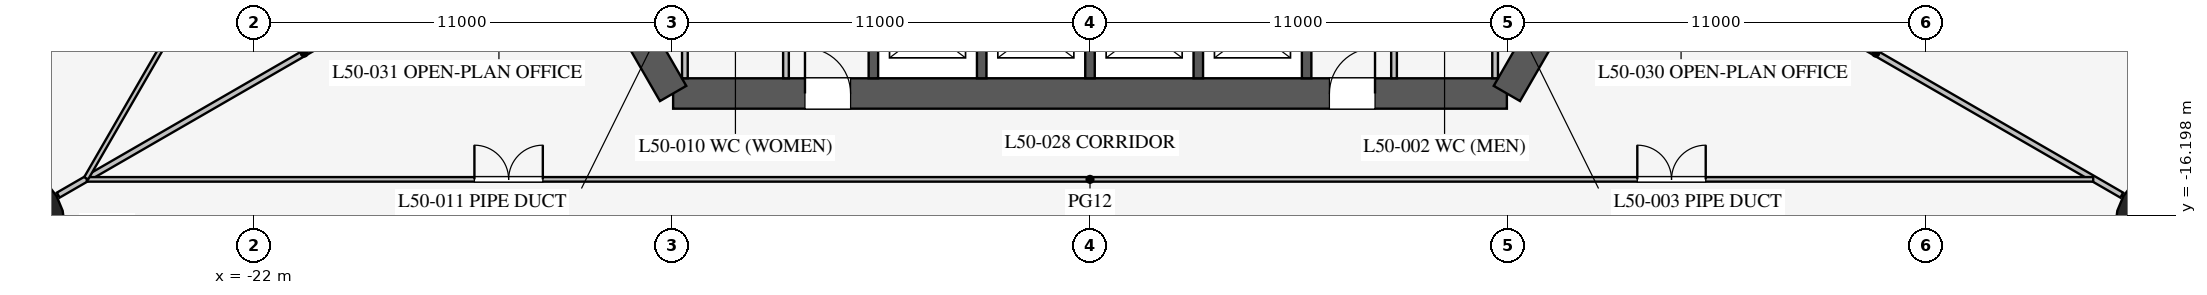
"""IFC4 building model, lengths in metres.
Left out: names, types, materials, properties, quantities, classifications, styles, units other than length and angle.
Written with IfcOpenShell. Run it as: python <this file> out.ifc"""

import sys

from ifc_helpers import new_model, si_unit, direction, frame, frame_2d, origin, origin_2d, place, context, subcontext, project, spatial, rectangle, circle, extrude, element, fill, save


model = new_model("IFC4")
c1 = context("Model", 3, precision=1e-05, world=origin(), true_north=direction((0.0, 1.0)))
c2 = subcontext(c1, "Body", "Model", "MODEL_VIEW")
j1 = project(units=[si_unit("LENGTHUNIT", "METRE"), si_unit("PLANEANGLEUNIT", "RADIAN")], contexts=[c1])
p1 = place(None, origin())
s1 = spatial("IfcSite", under=j1, at=p1, CompositionType="ELEMENT")
p2 = place(p1, origin())
s2 = spatial("IfcBuilding", under=s1, at=p2, CompositionType="ELEMENT")
p3 = place(p2, frame((0.0, 0.0, 219.1)))
s3 = spatial("IfcBuildingStorey", under=s2, at=p3, CompositionType="ELEMENT", Elevation=219.1)
for number, where, z_axis, x_axis in (
    (1, (28.579, -16.5, 0.0), (0.0, 0.0, 1.0), (1.0, 0.0, 0.0)),
    (2, (-28.579, -16.5, 0.0), (0.0, 0.0, 1.0), (1.0, 0.0, 0.0)),
):
    element("IfcColumn", number, at=place(p3, frame(where, z_axis=z_axis, x_axis=x_axis)), inside=s3, PredefinedType="COLUMN", context=c2, shape_type="SweptSolid", body=[
        extrude(circle(Radius=1.6, at=origin_2d()), origin(), (0.0, 0.0, 1.0), 4.2),
    ])
p4 = place(p3, frame((-10.97, -13.0, 0.0), z_axis=(0.0, 0.0, 1.0), x_axis=(1.0, 0.0, 0.0)))
e3 = element("IfcWall", 3, at=p4, inside=s3, PredefinedType="SHEAR", context=c2, shape_type="SweptSolid", body=[
    extrude(rectangle(XDim=21.939, YDim=0.8, at=frame_2d((10.97, 0.0))), origin(), (0.0, 0.0, 1.0), 4.2),
])
p5 = place(p4, frame((17.27, 0.0, 0.0)))
e4 = element("IfcOpeningElement", 4, at=p5, cuts=e3, PredefinedType="OPENING", context=c2, shape_type="SweptSolid", body=[
    extrude(rectangle(XDim=1.2, YDim=2.1, at=frame_2d((0.6, 1.05))), frame((0.0, 0.41, 0.0), z_axis=(0.0, -1.0, 0.0), x_axis=(1.0, 0.0, 0.0)), (0.0, 0.0, 1.0), 0.82),
])
p6 = place(p4, frame((3.47, 0.0, 0.0)))
e5 = element("IfcOpeningElement", 5, at=p6, cuts=e3, PredefinedType="OPENING", context=c2, shape_type="SweptSolid", body=[
    extrude(rectangle(XDim=1.2, YDim=2.1, at=frame_2d((0.6, 1.05))), frame((0.0, 0.41, 0.0), z_axis=(0.0, -1.0, 0.0), x_axis=(1.0, 0.0, 0.0)), (0.0, 0.0, 1.0), 0.82),
])
for number, where, z_axis, x_axis in (
    (6, (10.97, -13.0, 0.0), (0.0, 0.0, 1.0), (0.5, 0.866, 0.0)),
    (7, (-16.743, -3.0, 0.0), (0.0, 0.0, 1.0), (0.5, -0.866, 0.0)),
):
    element("IfcWall", number, at=place(p3, frame(where, z_axis=z_axis, x_axis=x_axis)), inside=s3, PredefinedType="SHEAR", context=c2, shape_type="SweptSolid", body=[
        extrude(rectangle(XDim=11.547, YDim=0.8, at=frame_2d((5.773, 0.0))), origin(), (0.0, 0.0, 1.0), 4.2),
    ])
for number, where, z_axis, x_axis in (
    (8, (-5.7, -10.025, 0.0), (0.0, 0.0, 1.0), (0.0, -1.0, 0.0)),
    (9, (-2.85, -10.025, 0.0), (0.0, 0.0, 1.0), (0.0, -1.0, 0.0)),
    (10, (0.0, -10.025, 0.0), (0.0, 0.0, 1.0), (0.0, -1.0, 0.0)),
    (11, (2.85, -10.025, 0.0), (0.0, 0.0, 1.0), (0.0, -1.0, 0.0)),
    (12, (5.7, -10.025, 0.0), (0.0, 0.0, 1.0), (0.0, -1.0, 0.0)),
):
    element("IfcWall", number, at=place(p3, frame(where, z_axis=z_axis, x_axis=x_axis)), inside=s3, PredefinedType="SHEAR", context=c2, shape_type="SweptSolid", body=[
        extrude(rectangle(XDim=2.575, YDim=0.25, at=frame_2d((1.288, 0.0))), origin(), (0.0, 0.0, 1.0), 4.2),
    ])
p7 = place(p3, frame((8.0, -7.5, 0.0), z_axis=(0.0, 0.0, 1.0), x_axis=(0.0, -1.0, 0.0)))
e13 = element("IfcWall", 13, at=p7, inside=s3, PredefinedType="PARTITIONING", context=c2, shape_type="SweptSolid", body=[
    extrude(rectangle(XDim=5.1, YDim=0.15, at=frame_2d((2.55, 0.0))), origin(), (0.0, 0.0, 1.0), 4.0),
])
p8 = place(p7, frame((1.3, 0.0, 0.0)))
e14 = element("IfcOpeningElement", 14, at=p8, cuts=e13, PredefinedType="OPENING", context=c2, shape_type="SweptSolid", body=[
    extrude(rectangle(XDim=0.9, YDim=2.1, at=frame_2d((0.45, 1.05))), frame((0.0, 0.085, 0.0), z_axis=(0.0, -1.0, 0.0), x_axis=(1.0, 0.0, 0.0)), (0.0, 0.0, 1.0), 0.17),
])
p9 = place(p3, frame((-8.0, -7.5, 0.0), z_axis=(0.0, 0.0, 1.0), x_axis=(0.0, -1.0, 0.0)))
e15 = element("IfcWall", 15, at=p9, inside=s3, PredefinedType="PARTITIONING", context=c2, shape_type="SweptSolid", body=[
    extrude(rectangle(XDim=5.1, YDim=0.15, at=frame_2d((2.55, 0.0))), origin(), (0.0, 0.0, 1.0), 4.0),
])
p10 = place(p9, frame((2.6, 0.0, 0.0)))
e16 = element("IfcOpeningElement", 16, at=p10, cuts=e15, PredefinedType="OPENING", context=c2, shape_type="SweptSolid", body=[
    extrude(rectangle(XDim=0.9, YDim=2.1, at=frame_2d((0.45, 1.05))), frame((0.0, 0.085, 0.0), z_axis=(0.0, -1.0, 0.0), x_axis=(1.0, 0.0, 0.0)), (0.0, 0.0, 1.0), 0.17),
])
for number, where, z_axis, x_axis in (
    (17, (10.66, -8.5, 0.0), (0.0, 0.0, 1.0), (0.0, -1.0, 0.0)),
    (18, (-10.66, -8.5, 0.0), (0.0, 0.0, 1.0), (0.0, -1.0, 0.0)),
):
    element("IfcWall", number, at=place(p3, frame(where, z_axis=z_axis, x_axis=x_axis)), inside=s3, PredefinedType="PARTITIONING", context=c2, shape_type="SweptSolid", body=[
        extrude(rectangle(XDim=4.1, YDim=0.15, at=frame_2d((2.05, 0.0))), origin(), (0.0, 0.0, 1.0), 4.0),
    ])
for number, where, z_axis, x_axis in (
    (19, (14.203, -8.2, 0.0), (0.0, 0.0, 1.0), (0.866, -0.5, 0.0)),
    (20, (-14.203, -8.2, 0.0), (0.0, 0.0, 1.0), (-0.866, -0.5, 0.0)),
):
    element("IfcWall", number, at=place(p3, frame(where, z_axis=z_axis, x_axis=x_axis)), inside=s3, PredefinedType="PARTITIONING", context=c2, shape_type="SweptSolid", body=[
        extrude(rectangle(XDim=14.95, YDim=0.15, at=frame_2d((7.475, 0.0))), origin(), (0.0, 0.0, 1.0), 2.4),
    ])
p11 = place(p3, frame((-26.398, -15.26, 0.0), z_axis=(0.0, 0.0, 1.0), x_axis=(1.0, 0.0, 0.0)))
e21 = element("IfcWall", 21, at=p11, inside=s3, PredefinedType="PARTITIONING", context=c2, shape_type="SweptSolid", body=[
    extrude(rectangle(XDim=52.796, YDim=0.12, at=frame_2d((26.398, 0.0))), origin(), (0.0, 0.0, 1.0), 2.9),
])
p12 = place(p11, frame((10.2, 0.0, 0.15)))
e22 = element("IfcOpeningElement", 22, at=p12, cuts=e21, PredefinedType="OPENING", context=c2, shape_type="SweptSolid", body=[
    extrude(rectangle(XDim=1.8, YDim=2.1, at=frame_2d((0.9, 1.05))), frame((0.0, 0.07, 0.0), z_axis=(0.0, -1.0, 0.0), x_axis=(1.0, 0.0, 0.0)), (0.0, 0.0, 1.0), 0.14),
])
p13 = place(p11, frame((40.8, 0.0, 0.15)))
e23 = element("IfcOpeningElement", 23, at=p13, cuts=e21, PredefinedType="OPENING", context=c2, shape_type="SweptSolid", body=[
    extrude(rectangle(XDim=1.8, YDim=2.1, at=frame_2d((0.9, 1.05))), frame((0.0, 0.07, 0.0), z_axis=(0.0, -1.0, 0.0), x_axis=(1.0, 0.0, 0.0)), (0.0, 0.0, 1.0), 0.14),
])
p14 = place(p3, frame((-0.016, 30.491, 0.0), z_axis=(0.0, 0.0, 1.0), x_axis=(-0.50000091641, -0.866024874695, 0.0)))
e24 = element("IfcWall", 24, at=p14, inside=s3, PredefinedType="PARTITIONING", context=c2, shape_type="SweptSolid", body=[
    extrude(rectangle(XDim=52.796, YDim=0.12, at=frame_2d((26.398, 0.0))), origin(), (0.0, 0.0, 1.0), 2.9),
])
p15 = place(p14, frame((10.2, 0.0, 0.15)))
e25 = element("IfcOpeningElement", 25, at=p15, cuts=e24, PredefinedType="OPENING", context=c2, shape_type="SweptSolid", body=[
    extrude(rectangle(XDim=1.8, YDim=2.1, at=frame_2d((0.9, 1.05))), frame((0.0, 0.07, 0.0), z_axis=(0.0, -1.0, 0.0), x_axis=(1.0, 0.0, 0.0)), (0.0, 0.0, 1.0), 0.14),
])
p16 = place(p14, frame((40.8, 0.0, 0.15)))
e26 = element("IfcOpeningElement", 26, at=p16, cuts=e24, PredefinedType="OPENING", context=c2, shape_type="SweptSolid", body=[
    extrude(rectangle(XDim=1.8, YDim=2.1, at=frame_2d((0.9, 1.05))), frame((0.0, 0.07, 0.0), z_axis=(0.0, -1.0, 0.0), x_axis=(1.0, 0.0, 0.0)), (0.0, 0.0, 1.0), 0.14),
])
p17 = place(p5, origin())
e27 = element("IfcDoor", 27, at=p17, inside=s3, OperationType="SINGLE_SWING_RIGHT", PredefinedType="DOOR", context=c2, shape_type="SweptSolid", body=[
    extrude(rectangle(XDim=1.2, YDim=2.1, at=frame_2d((0.6, 1.05))), frame((0.0, 0.025, 0.0), z_axis=(0.0, -1.0, 0.0), x_axis=(1.0, 0.0, 0.0)), (0.0, 0.0, 1.0), 0.05),
])
fill(e4, e27)
p18 = place(p6, origin())
e28 = element("IfcDoor", 28, at=p18, inside=s3, OperationType="SINGLE_SWING_LEFT", PredefinedType="DOOR", context=c2, shape_type="SweptSolid", body=[
    extrude(rectangle(XDim=1.2, YDim=2.1, at=frame_2d((0.6, 1.05))), frame((0.0, 0.025, 0.0), z_axis=(0.0, -1.0, 0.0), x_axis=(1.0, 0.0, 0.0)), (0.0, 0.0, 1.0), 0.05),
])
fill(e5, e28)
p19 = place(p12, origin())
e29 = element("IfcDoor", 29, at=p19, inside=s3, OperationType="DOUBLE_DOOR_SINGLE_SWING", PredefinedType="DOOR", context=c2, shape_type="SweptSolid", body=[
    extrude(rectangle(XDim=1.8, YDim=2.1, at=frame_2d((0.9, 1.05))), frame((0.0, 0.025, 0.0), z_axis=(0.0, -1.0, 0.0), x_axis=(1.0, 0.0, 0.0)), (0.0, 0.0, 1.0), 0.05),
])
fill(e22, e29)
p20 = place(p13, origin())
e30 = element("IfcDoor", 30, at=p20, inside=s3, OperationType="DOUBLE_DOOR_SINGLE_SWING", PredefinedType="DOOR", context=c2, shape_type="SweptSolid", body=[
    extrude(rectangle(XDim=1.8, YDim=2.1, at=frame_2d((0.9, 1.05))), frame((0.0, 0.025, 0.0), z_axis=(0.0, -1.0, 0.0), x_axis=(1.0, 0.0, 0.0)), (0.0, 0.0, 1.0), 0.05),
])
fill(e23, e30)
save(model, sys.argv[1])
